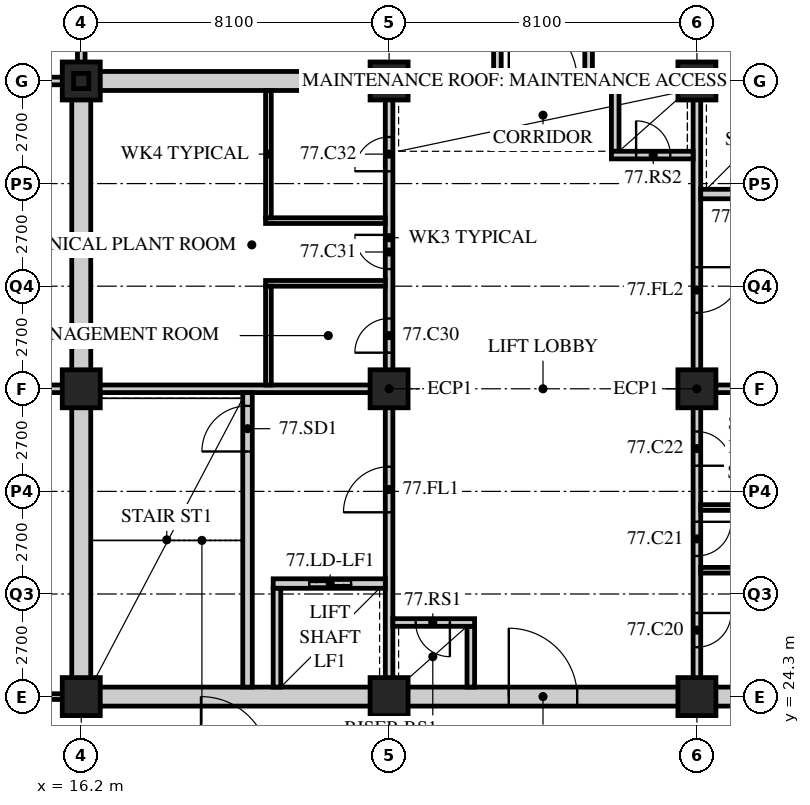
"""IFC4 building model, lengths in metres.
Left out: names, types, materials, properties, quantities, classifications, styles, units other than length and angle.
Written with IfcOpenShell. Run it as: python <this file> out.ifc"""

import sys

from ifc_helpers import new_model, si_unit, direction, frame, frame_2d, origin, origin_2d, place, context, subcontext, project, spatial, rectangle, hollow_rectangle, extrude, element, fill, save


model = new_model("IFC4")
c1 = context("Model", 3, precision=1e-05, world=origin(), true_north=direction((0.0, 1.0)))
c2 = subcontext(c1, "Body", "Model", "MODEL_VIEW")
j1 = project(units=[si_unit("LENGTHUNIT", "METRE"), si_unit("PLANEANGLEUNIT", "RADIAN")], contexts=[c1])
p1 = place(None, origin())
s1 = spatial("IfcSite", under=j1, at=p1, CompositionType="ELEMENT")
p2 = place(p1, origin())
s2 = spatial("IfcBuilding", under=s1, at=p2, CompositionType="ELEMENT")
p3 = place(p2, frame((0.0, 0.0, 303.9)))
s3 = spatial("IfcBuildingStorey", under=s2, at=p3, CompositionType="ELEMENT", Elevation=303.9)
for number, where, z_axis, x_axis in (
    (1, (16.2, 24.3, 0.0), (0.0, 0.0, 1.0), (1.0, 0.0, 0.0)),
    (2, (16.2, 32.4, 0.0), (0.0, 0.0, 1.0), (1.0, 0.0, 0.0)),
    (3, (16.2, 40.5, 0.0), (0.0, 0.0, 1.0), (1.0, 0.0, 0.0)),
    (4, (24.3, 24.3, 0.0), (0.0, 0.0, 1.0), (1.0, 0.0, 0.0)),
    (5, (24.3, 32.4, 0.0), (0.0, 0.0, 1.0), (1.0, 0.0, 0.0)),
    (6, (24.3, 40.5, 0.0), (0.0, 0.0, 1.0), (1.0, 0.0, 0.0)),
    (7, (32.4, 24.3, 0.0), (0.0, 0.0, 1.0), (1.0, 0.0, 0.0)),
    (8, (32.4, 32.4, 0.0), (0.0, 0.0, 1.0), (1.0, 0.0, 0.0)),
    (9, (32.4, 40.5, 0.0), (0.0, 0.0, 1.0), (1.0, 0.0, 0.0)),
):
    element("IfcColumn", number, at=place(p3, frame(where, z_axis=z_axis, x_axis=x_axis)), inside=s3, PredefinedType="COLUMN", context=c2, shape_type="SweptSolid", body=[
        extrude(hollow_rectangle(XDim=1.0, YDim=1.0, WallThickness=0.1, at=origin_2d()), origin(), (0.0, 0.0, 1.0), 6.0),
    ])
for number, where, z_axis, x_axis in (
    (10, (16.2, 40.5, 6.0), (0.0, 0.0, 1.0), (1.0, 0.0, 0.0)),
    (11, (24.3, 40.5, 6.0), (0.0, 0.0, 1.0), (1.0, 0.0, 0.0)),
    (12, (32.4, 40.5, 6.0), (0.0, 0.0, 1.0), (1.0, 0.0, 0.0)),
):
    element("IfcColumn", number, at=place(p3, frame(where, z_axis=z_axis, x_axis=x_axis)), inside=s3, PredefinedType="COLUMN", context=c2, shape_type="SweptSolid", body=[
        extrude(hollow_rectangle(XDim=0.4, YDim=0.4, WallThickness=0.016, at=origin_2d()), origin(), (0.0, 0.0, 1.0), 13.896),
    ])
p4 = place(p3, frame((9.9, 24.3, 0.0), z_axis=(0.0, 0.0, 1.0), x_axis=(1.0, 0.0, 0.0)))
e13 = element("IfcWall", 13, at=p4, inside=s3, PredefinedType="PARTITIONING", context=c2, shape_type="SweptSolid", body=[
    extrude(rectangle(XDim=6.1, YDim=0.15, at=frame_2d((3.05, 0.0))), origin(), (0.0, 0.0, 1.0), 5.038),
])
p5 = place(p3, frame((9.9, 32.4, 0.0), z_axis=(0.0, 0.0, 1.0), x_axis=(1.0, 0.0, 0.0)))
e14 = element("IfcWall", 14, at=p5, inside=s3, PredefinedType="SOLIDWALL", context=c2, shape_type="SweptSolid", body=[
    extrude(rectangle(XDim=6.3, YDim=0.2, at=frame_2d((3.15, 0.0))), origin(), (0.0, 0.0, 1.0), 5.038),
])
p6 = place(p3, frame((16.2, 40.5, 0.0), z_axis=(0.0, 0.0, 1.0), x_axis=(0.0, 1.0, 0.0)))
e15 = element("IfcWall", 15, at=p6, inside=s3, PredefinedType="SOLIDWALL", context=c2, shape_type="SweptSolid", body=[
    extrude(rectangle(XDim=14.4, YDim=0.2, at=frame_2d((7.2, 0.0))), origin(), (0.0, 0.0, 1.0), 5.038),
])
for number, where, z_axis, x_axis in (
    (16, (27.15, 40.5, 0.0), (0.0, 0.0, 1.0), (0.0, 1.0, 0.0)),
    (17, (29.55, 40.5, 0.0), (0.0, 0.0, 1.0), (0.0, 1.0, 0.0)),
):
    element("IfcWall", number, at=place(p3, frame(where, z_axis=z_axis, x_axis=x_axis)), inside=s3, PredefinedType="SOLIDWALL", context=c2, shape_type="SweptSolid", body=[
        extrude(rectangle(XDim=14.4, YDim=0.2, at=frame_2d((7.2, 0.0))), origin(), (0.0, 0.0, 1.0), 5.8),
    ])
p7 = place(p3, frame((9.9, 40.5, 0.0), z_axis=(0.0, 0.0, 1.0), x_axis=(1.0, 0.0, 0.0)))
e18 = element("IfcWall", 18, at=p7, inside=s3, PredefinedType="SOLIDWALL", context=c2, shape_type="SweptSolid", body=[
    extrude(rectangle(XDim=6.3, YDim=0.2, at=frame_2d((3.15, 0.0))), origin(), (0.0, 0.0, 1.0), 5.038),
])
p8 = place(p3, frame((15.95, 24.3, 0.0), z_axis=(0.0, 0.0, 1.0), x_axis=(1.0, 0.0, 0.0)))
e19 = element("IfcWall", 19, at=p8, inside=s3, PredefinedType="SOLIDWALL", context=c2, shape_type="SweptSolid", body=[
    extrude(rectangle(XDim=24.8, YDim=0.5, at=frame_2d((12.4, 0.0))), origin(), (0.0, 0.0, 1.0), 5.038),
])
p9 = place(p8, frame((11.5, 0.0, 0.0)))
e20 = element("IfcOpeningElement", 20, at=p9, cuts=e19, PredefinedType="OPENING", context=c2, shape_type="SweptSolid", body=[
    extrude(rectangle(XDim=1.8, YDim=2.4, at=frame_2d((0.9, 1.2))), frame((0.0, 0.26, 0.0), z_axis=(0.0, -1.0, 0.0), x_axis=(1.0, 0.0, 0.0)), (0.0, 0.0, 1.0), 0.52),
])
p10 = place(p3, frame((15.95, 40.5, 0.0), z_axis=(0.0, 0.0, 1.0), x_axis=(1.0, 0.0, 0.0)))
e21 = element("IfcWall", 21, at=p10, inside=s3, PredefinedType="SOLIDWALL", context=c2, shape_type="SweptSolid", body=[
    extrude(rectangle(XDim=24.8, YDim=0.5, at=frame_2d((12.4, 0.0))), origin(), (0.0, 0.0, 1.0), 5.038),
])
p11 = place(p10, frame((11.5, 0.0, 0.0)))
e22 = element("IfcOpeningElement", 22, at=p11, cuts=e21, PredefinedType="OPENING", context=c2, shape_type="SweptSolid", body=[
    extrude(rectangle(XDim=1.8, YDim=2.4, at=frame_2d((0.9, 1.2))), frame((0.0, 0.26, 0.0), z_axis=(0.0, -1.0, 0.0), x_axis=(1.0, 0.0, 0.0)), (0.0, 0.0, 1.0), 0.52),
])
p12 = place(p3, frame((16.2, 24.55, 0.0), z_axis=(0.0, 0.0, 1.0), x_axis=(0.0, 1.0, 0.0)))
e23 = element("IfcWall", 23, at=p12, inside=s3, PredefinedType="SOLIDWALL", context=c2, shape_type="SweptSolid", body=[
    extrude(rectangle(XDim=15.7, YDim=0.5, at=frame_2d((7.85, 0.0))), origin(), (0.0, 0.0, 1.0), 5.038),
])
p13 = place(p3, frame((16.45, 32.4, 0.0), z_axis=(0.0, 0.0, 1.0), x_axis=(1.0, 0.0, 0.0)))
e24 = element("IfcWall", 24, at=p13, inside=s3, PredefinedType="SOLIDWALL", context=c2, shape_type="SweptSolid", body=[
    extrude(rectangle(XDim=7.95, YDim=0.2, at=frame_2d((3.975, 0.0))), origin(), (0.0, 0.0, 1.0), 5.038),
])
p14 = place(p3, frame((24.3, 24.55, 0.0), z_axis=(0.0, 0.0, 1.0), x_axis=(0.0, 1.0, 0.0)))
e25 = element("IfcWall", 25, at=p14, inside=s3, PredefinedType="SOLIDWALL", context=c2, shape_type="SweptSolid", body=[
    extrude(rectangle(XDim=7.75, YDim=0.2, at=frame_2d((3.875, 0.0))), origin(), (0.0, 0.0, 1.0), 5.038),
])
p15 = place(p14, frame((4.6, 0.0, 0.0)))
e26 = element("IfcOpeningElement", 26, at=p15, cuts=e25, PredefinedType="OPENING", context=c2, shape_type="SweptSolid", body=[
    extrude(rectangle(XDim=1.2, YDim=2.1, at=frame_2d((0.6, 1.05))), frame((0.0, 0.11, 0.0), z_axis=(0.0, -1.0, 0.0), x_axis=(1.0, 0.0, 0.0)), (0.0, 0.0, 1.0), 0.22),
])
p16 = place(p3, frame((20.575, 24.55, 0.0), z_axis=(0.0, 0.0, 1.0), x_axis=(0.0, 1.0, 0.0)))
e27 = element("IfcWall", 27, at=p16, inside=s3, PredefinedType="SOLIDWALL", context=c2, shape_type="SweptSolid", body=[
    extrude(rectangle(XDim=7.75, YDim=0.25, at=frame_2d((3.875, 0.0))), origin(), (0.0, 0.0, 1.0), 5.8),
])
p17 = place(p16, frame((6.2, 0.0, 0.0)))
e28 = element("IfcOpeningElement", 28, at=p17, cuts=e27, PredefinedType="OPENING", context=c2, shape_type="SweptSolid", body=[
    extrude(rectangle(XDim=1.2, YDim=2.1, at=frame_2d((0.6, 1.05))), frame((0.0, 0.135, 0.0), z_axis=(0.0, -1.0, 0.0), x_axis=(1.0, 0.0, 0.0)), (0.0, 0.0, 1.0), 0.27),
])
p18 = place(p3, frame((21.25, 27.275, 0.0), z_axis=(0.0, 0.0, 1.0), x_axis=(1.0, 0.0, 0.0)))
e29 = element("IfcWall", 29, at=p18, inside=s3, PredefinedType="SOLIDWALL", context=c2, shape_type="SweptSolid", body=[
    extrude(rectangle(XDim=2.95, YDim=0.25, at=frame_2d((1.475, 0.0))), origin(), (0.0, 0.0, 1.0), 5.8),
])
p19 = place(p18, frame((0.95, 0.0, 0.0)))
e30 = element("IfcOpeningElement", 30, at=p19, cuts=e29, PredefinedType="OPENING", context=c2, shape_type="SweptSolid", body=[
    extrude(rectangle(XDim=1.1, YDim=2.4, at=frame_2d((0.55, 1.2))), frame((0.0, 0.135, 0.0), z_axis=(0.0, -1.0, 0.0), x_axis=(1.0, 0.0, 0.0)), (0.0, 0.0, 1.0), 0.27),
])
p20 = place(p3, frame((21.35, 24.55, 0.0), z_axis=(0.0, 0.0, 1.0), x_axis=(0.0, 1.0, 0.0)))
e31 = element("IfcWall", 31, at=p20, inside=s3, PredefinedType="SOLIDWALL", context=c2, shape_type="SweptSolid", body=[
    extrude(rectangle(XDim=2.6, YDim=0.2, at=frame_2d((1.3, 0.0))), origin(), (0.0, 0.0, 1.0), 5.8),
])
p21 = place(p3, frame((26.45, 24.55, 0.0), z_axis=(0.0, 0.0, 1.0), x_axis=(0.0, 1.0, 0.0)))
e32 = element("IfcWall", 32, at=p21, inside=s3, PredefinedType="SOLIDWALL", context=c2, shape_type="SweptSolid", body=[
    extrude(rectangle(XDim=1.6, YDim=0.2, at=frame_2d((0.8, 0.0))), origin(), (0.0, 0.0, 1.0), 5.8),
])
p22 = place(p3, frame((24.4, 26.25, 0.0), z_axis=(0.0, 0.0, 1.0), x_axis=(1.0, 0.0, 0.0)))
e33 = element("IfcWall", 33, at=p22, inside=s3, PredefinedType="SOLIDWALL", context=c2, shape_type="SweptSolid", body=[
    extrude(rectangle(XDim=2.15, YDim=0.2, at=frame_2d((1.075, 0.0))), origin(), (0.0, 0.0, 1.0), 5.8),
])
p23 = place(p22, frame((0.6, 0.0, 0.0)))
e34 = element("IfcOpeningElement", 34, at=p23, cuts=e33, PredefinedType="OPENING", context=c2, shape_type="SweptSolid", body=[
    extrude(rectangle(XDim=0.9, YDim=2.1, at=frame_2d((0.45, 1.05))), frame((0.0, 0.11, 0.0), z_axis=(0.0, -1.0, 0.0), x_axis=(1.0, 0.0, 0.0)), (0.0, 0.0, 1.0), 0.22),
])
p24 = place(p3, frame((32.3, 32.4, 0.0), z_axis=(0.0, 0.0, 1.0), x_axis=(1.0, 0.0, 0.0)))
e35 = element("IfcWall", 35, at=p24, inside=s3, PredefinedType="SOLIDWALL", context=c2, shape_type="SweptSolid", body=[
    extrude(rectangle(XDim=7.95, YDim=0.2, at=frame_2d((3.975, 0.0))), origin(), (0.0, 0.0, 1.0), 5.038),
])
p25 = place(p3, frame((32.4, 32.5, 0.0), z_axis=(0.0, 0.0, 1.0), x_axis=(0.0, 1.0, 0.0)))
e36 = element("IfcWall", 36, at=p25, inside=s3, PredefinedType="SOLIDWALL", context=c2, shape_type="SweptSolid", body=[
    extrude(rectangle(XDim=7.75, YDim=0.2, at=frame_2d((3.875, 0.0))), origin(), (0.0, 0.0, 1.0), 5.038),
])
p26 = place(p25, frame((1.9, 0.0, 0.0)))
e37 = element("IfcOpeningElement", 37, at=p26, cuts=e36, PredefinedType="OPENING", context=c2, shape_type="SweptSolid", body=[
    extrude(rectangle(XDim=1.2, YDim=2.1, at=frame_2d((0.6, 1.05))), frame((0.0, 0.11, 0.0), z_axis=(0.0, -1.0, 0.0), x_axis=(1.0, 0.0, 0.0)), (0.0, 0.0, 1.0), 0.22),
])
p27 = place(p3, frame((32.5, 37.525, 0.0), z_axis=(0.0, 0.0, 1.0), x_axis=(1.0, 0.0, 0.0)))
e38 = element("IfcWall", 38, at=p27, inside=s3, PredefinedType="SOLIDWALL", context=c2, shape_type="SweptSolid", body=[
    extrude(rectangle(XDim=2.95, YDim=0.25, at=frame_2d((1.475, 0.0))), origin(), (0.0, 0.0, 1.0), 5.8),
])
p28 = place(p27, frame((0.9, 0.0, 0.0)))
e39 = element("IfcOpeningElement", 39, at=p28, cuts=e38, PredefinedType="OPENING", context=c2, shape_type="SweptSolid", body=[
    extrude(rectangle(XDim=1.1, YDim=2.4, at=frame_2d((0.55, 1.2))), frame((0.0, 0.135, 0.0), z_axis=(0.0, -1.0, 0.0), x_axis=(1.0, 0.0, 0.0)), (0.0, 0.0, 1.0), 0.27),
])
p29 = place(p3, frame((30.25, 38.65, 0.0), z_axis=(0.0, 0.0, 1.0), x_axis=(0.0, 1.0, 0.0)))
e40 = element("IfcWall", 40, at=p29, inside=s3, PredefinedType="SOLIDWALL", context=c2, shape_type="SweptSolid", body=[
    extrude(rectangle(XDim=1.6, YDim=0.2, at=frame_2d((0.8, 0.0))), origin(), (0.0, 0.0, 1.0), 5.8),
])
p30 = place(p3, frame((30.15, 38.55, 0.0), z_axis=(0.0, 0.0, 1.0), x_axis=(1.0, 0.0, 0.0)))
e41 = element("IfcWall", 41, at=p30, inside=s3, PredefinedType="SOLIDWALL", context=c2, shape_type="SweptSolid", body=[
    extrude(rectangle(XDim=2.15, YDim=0.2, at=frame_2d((1.075, 0.0))), origin(), (0.0, 0.0, 1.0), 5.8),
])
p31 = place(p30, frame((0.65, 0.0, 0.0)))
e42 = element("IfcOpeningElement", 42, at=p31, cuts=e41, PredefinedType="OPENING", context=c2, shape_type="SweptSolid", body=[
    extrude(rectangle(XDim=0.9, YDim=2.1, at=frame_2d((0.45, 1.05))), frame((0.0, 0.11, 0.0), z_axis=(0.0, -1.0, 0.0), x_axis=(1.0, 0.0, 0.0)), (0.0, 0.0, 1.0), 0.22),
])
p32 = place(p3, frame((24.3, 32.5, 0.0), z_axis=(0.0, 0.0, 1.0), x_axis=(0.0, 1.0, 0.0)))
e43 = element("IfcWall", 43, at=p32, inside=s3, PredefinedType="PARTITIONING", context=c2, shape_type="SweptSolid", body=[
    extrude(rectangle(XDim=7.75, YDim=0.2, at=frame_2d((3.875, 0.0))), origin(), (0.0, 0.0, 1.0), 5.038),
])
p33 = place(p32, frame((0.85, 0.0, 0.0)))
e44 = element("IfcOpeningElement", 44, at=p33, cuts=e43, PredefinedType="OPENING", context=c2, shape_type="SweptSolid", body=[
    extrude(rectangle(XDim=0.9, YDim=2.1, at=frame_2d((0.45, 1.05))), frame((0.0, 0.11, 0.0), z_axis=(0.0, -1.0, 0.0), x_axis=(1.0, 0.0, 0.0)), (0.0, 0.0, 1.0), 0.22),
])
p34 = place(p32, frame((3.05, 0.0, 0.0)))
e45 = element("IfcOpeningElement", 45, at=p34, cuts=e43, PredefinedType="OPENING", context=c2, shape_type="SweptSolid", body=[
    extrude(rectangle(XDim=0.9, YDim=2.1, at=frame_2d((0.45, 1.05))), frame((0.0, 0.11, 0.0), z_axis=(0.0, -1.0, 0.0), x_axis=(1.0, 0.0, 0.0)), (0.0, 0.0, 1.0), 0.22),
])
p35 = place(p32, frame((5.625, 0.0, 0.0)))
e46 = element("IfcOpeningElement", 46, at=p35, cuts=e43, PredefinedType="OPENING", context=c2, shape_type="SweptSolid", body=[
    extrude(rectangle(XDim=0.9, YDim=2.1, at=frame_2d((0.45, 1.05))), frame((0.0, 0.11, 0.0), z_axis=(0.0, -1.0, 0.0), x_axis=(1.0, 0.0, 0.0)), (0.0, 0.0, 1.0), 0.22),
])
for number, where, z_axis, x_axis in (
    (47, (21.05, 35.175, 0.0), (0.0, 0.0, 1.0), (1.0, 0.0, 0.0)),
    (48, (21.05, 36.825, 0.0), (0.0, 0.0, 1.0), (1.0, 0.0, 0.0)),
):
    element("IfcWall", number, at=place(p3, frame(where, z_axis=z_axis, x_axis=x_axis)), inside=s3, PredefinedType="PARTITIONING", context=c2, shape_type="SweptSolid", body=[
        extrude(rectangle(XDim=3.15, YDim=0.15, at=frame_2d((1.575, 0.0))), origin(), (0.0, 0.0, 1.0), 5.8),
    ])
p36 = place(p3, frame((21.125, 32.5, 0.0), z_axis=(0.0, 0.0, 1.0), x_axis=(0.0, 1.0, 0.0)))
e49 = element("IfcWall", 49, at=p36, inside=s3, PredefinedType="PARTITIONING", context=c2, shape_type="SweptSolid", body=[
    extrude(rectangle(XDim=2.6, YDim=0.15, at=frame_2d((1.3, 0.0))), origin(), (0.0, 0.0, 1.0), 5.8),
])
p37 = place(p3, frame((21.125, 36.9, 0.0), z_axis=(0.0, 0.0, 1.0), x_axis=(0.0, 1.0, 0.0)))
e50 = element("IfcWall", 50, at=p37, inside=s3, PredefinedType="PARTITIONING", context=c2, shape_type="SweptSolid", body=[
    extrude(rectangle(XDim=3.35, YDim=0.15, at=frame_2d((1.675, 0.0))), origin(), (0.0, 0.0, 1.0), 5.8),
])
p38 = place(p3, frame((32.4, 24.55, 0.0), z_axis=(0.0, 0.0, 1.0), x_axis=(0.0, 1.0, 0.0)))
e51 = element("IfcWall", 51, at=p38, inside=s3, PredefinedType="PARTITIONING", context=c2, shape_type="SweptSolid", body=[
    extrude(rectangle(XDim=7.75, YDim=0.2, at=frame_2d((3.875, 0.0))), origin(), (0.0, 0.0, 1.0), 5.038),
])
p39 = place(p38, frame((1.05, 0.0, 0.0)))
e52 = element("IfcOpeningElement", 52, at=p39, cuts=e51, PredefinedType="OPENING", context=c2, shape_type="SweptSolid", body=[
    extrude(rectangle(XDim=0.9, YDim=2.1, at=frame_2d((0.45, 1.05))), frame((0.0, 0.11, 0.0), z_axis=(0.0, -1.0, 0.0), x_axis=(1.0, 0.0, 0.0)), (0.0, 0.0, 1.0), 0.22),
])
p40 = place(p38, frame((3.45, 0.0, 0.0)))
e53 = element("IfcOpeningElement", 53, at=p40, cuts=e51, PredefinedType="OPENING", context=c2, shape_type="SweptSolid", body=[
    extrude(rectangle(XDim=0.9, YDim=2.1, at=frame_2d((0.45, 1.05))), frame((0.0, 0.11, 0.0), z_axis=(0.0, -1.0, 0.0), x_axis=(1.0, 0.0, 0.0)), (0.0, 0.0, 1.0), 0.22),
])
p41 = place(p38, frame((5.825, 0.0, 0.0)))
e54 = element("IfcOpeningElement", 54, at=p41, cuts=e51, PredefinedType="OPENING", context=c2, shape_type="SweptSolid", body=[
    extrude(rectangle(XDim=0.9, YDim=2.1, at=frame_2d((0.45, 1.05))), frame((0.0, 0.11, 0.0), z_axis=(0.0, -1.0, 0.0), x_axis=(1.0, 0.0, 0.0)), (0.0, 0.0, 1.0), 0.22),
])
for number, where, z_axis, x_axis in (
    (55, (32.5, 27.625, 0.0), (0.0, 0.0, 1.0), (1.0, 0.0, 0.0)),
    (56, (32.5, 29.275, 0.0), (0.0, 0.0, 1.0), (1.0, 0.0, 0.0)),
):
    element("IfcWall", number, at=place(p3, frame(where, z_axis=z_axis, x_axis=x_axis)), inside=s3, PredefinedType="PARTITIONING", context=c2, shape_type="SweptSolid", body=[
        extrude(rectangle(XDim=3.15, YDim=0.15, at=frame_2d((1.575, 0.0))), origin(), (0.0, 0.0, 1.0), 5.8),
    ])
p42 = place(p33, origin())
e57 = element("IfcDoor", 57, at=p42, inside=s3, OperationType="SINGLE_SWING_LEFT", PredefinedType="DOOR", context=c2, shape_type="SweptSolid", body=[
    extrude(rectangle(XDim=0.9, YDim=2.1, at=frame_2d((0.45, 1.05))), frame((0.0, 0.025, 0.0), z_axis=(0.0, -1.0, 0.0), x_axis=(1.0, 0.0, 0.0)), (0.0, 0.0, 1.0), 0.05),
])
fill(e44, e57)
p43 = place(p34, origin())
e58 = element("IfcDoor", 58, at=p43, inside=s3, OperationType="SINGLE_SWING_RIGHT", PredefinedType="DOOR", context=c2, shape_type="SweptSolid", body=[
    extrude(rectangle(XDim=0.9, YDim=2.1, at=frame_2d((0.45, 1.05))), frame((0.0, 0.025, 0.0), z_axis=(0.0, -1.0, 0.0), x_axis=(1.0, 0.0, 0.0)), (0.0, 0.0, 1.0), 0.05),
])
fill(e45, e58)
p44 = place(p35, origin())
e59 = element("IfcDoor", 59, at=p44, inside=s3, OperationType="SINGLE_SWING_LEFT", PredefinedType="DOOR", context=c2, shape_type="SweptSolid", body=[
    extrude(rectangle(XDim=0.9, YDim=2.1, at=frame_2d((0.45, 1.05))), frame((0.0, 0.025, 0.0), z_axis=(0.0, -1.0, 0.0), x_axis=(1.0, 0.0, 0.0)), (0.0, 0.0, 1.0), 0.05),
])
fill(e46, e59)
p45 = place(p39, origin())
e60 = element("IfcDoor", 60, at=p45, inside=s3, OperationType="SINGLE_SWING_LEFT", PredefinedType="DOOR", context=c2, shape_type="SweptSolid", body=[
    extrude(rectangle(XDim=0.9, YDim=2.1, at=frame_2d((0.45, 1.05))), frame((0.0, 0.025, 0.0), z_axis=(0.0, -1.0, 0.0), x_axis=(1.0, 0.0, 0.0)), (0.0, 0.0, 1.0), 0.05),
])
fill(e52, e60)
p46 = place(p40, origin())
e61 = element("IfcDoor", 61, at=p46, inside=s3, OperationType="SINGLE_SWING_LEFT", PredefinedType="DOOR", context=c2, shape_type="SweptSolid", body=[
    extrude(rectangle(XDim=0.9, YDim=2.1, at=frame_2d((0.45, 1.05))), frame((0.0, 0.025, 0.0), z_axis=(0.0, -1.0, 0.0), x_axis=(1.0, 0.0, 0.0)), (0.0, 0.0, 1.0), 0.05),
])
fill(e53, e61)
p47 = place(p41, origin())
e62 = element("IfcDoor", 62, at=p47, inside=s3, OperationType="SINGLE_SWING_RIGHT", PredefinedType="DOOR", context=c2, shape_type="SweptSolid", body=[
    extrude(rectangle(XDim=0.9, YDim=2.1, at=frame_2d((0.45, 1.05))), frame((0.0, 0.025, 0.0), z_axis=(0.0, -1.0, 0.0), x_axis=(1.0, 0.0, 0.0)), (0.0, 0.0, 1.0), 0.05),
])
fill(e54, e62)
p48 = place(p17, origin())
e63 = element("IfcDoor", 63, at=p48, inside=s3, OperationType="SINGLE_SWING_LEFT", PredefinedType="DOOR", context=c2, shape_type="SweptSolid", body=[
    extrude(rectangle(XDim=1.2, YDim=2.1, at=frame_2d((0.6, 1.05))), frame((0.0, 0.025, 0.0), z_axis=(0.0, -1.0, 0.0), x_axis=(1.0, 0.0, 0.0)), (0.0, 0.0, 1.0), 0.05),
])
fill(e28, e63)
p49 = place(p15, origin())
e64 = element("IfcDoor", 64, at=p49, inside=s3, OperationType="SINGLE_SWING_LEFT", PredefinedType="DOOR", context=c2, shape_type="SweptSolid", body=[
    extrude(rectangle(XDim=1.2, YDim=2.1, at=frame_2d((0.6, 1.05))), frame((0.0, 0.025, 0.0), z_axis=(0.0, -1.0, 0.0), x_axis=(1.0, 0.0, 0.0)), (0.0, 0.0, 1.0), 0.05),
])
fill(e26, e64)
p50 = place(p23, origin())
e65 = element("IfcDoor", 65, at=p50, inside=s3, OperationType="SINGLE_SWING_LEFT", PredefinedType="DOOR", context=c2, shape_type="SweptSolid", body=[
    extrude(rectangle(XDim=0.9, YDim=2.1, at=frame_2d((0.45, 1.05))), frame((0.0, 0.025, 0.0), z_axis=(0.0, -1.0, 0.0), x_axis=(1.0, 0.0, 0.0)), (0.0, 0.0, 1.0), 0.05),
])
fill(e34, e65)
p51 = place(p26, origin())
e66 = element("IfcDoor", 66, at=p51, inside=s3, OperationType="SINGLE_SWING_LEFT", PredefinedType="DOOR", context=c2, shape_type="SweptSolid", body=[
    extrude(rectangle(XDim=1.2, YDim=2.1, at=frame_2d((0.6, 1.05))), frame((0.0, 0.025, 0.0), z_axis=(0.0, -1.0, 0.0), x_axis=(1.0, 0.0, 0.0)), (0.0, 0.0, 1.0), 0.05),
])
fill(e37, e66)
p52 = place(p31, origin())
e67 = element("IfcDoor", 67, at=p52, inside=s3, OperationType="SINGLE_SWING_LEFT", PredefinedType="DOOR", context=c2, shape_type="SweptSolid", body=[
    extrude(rectangle(XDim=0.9, YDim=2.1, at=frame_2d((0.45, 1.05))), frame((0.0, 0.025, 0.0), z_axis=(0.0, -1.0, 0.0), x_axis=(1.0, 0.0, 0.0)), (0.0, 0.0, 1.0), 0.05),
])
fill(e42, e67)
p53 = place(p19, origin())
e68 = element("IfcDoor", 68, at=p53, inside=s3, OperationType="DOUBLE_DOOR_SLIDING", PredefinedType="DOOR", context=c2, shape_type="SweptSolid", body=[
    extrude(rectangle(XDim=1.1, YDim=2.4, at=frame_2d((0.55, 1.2))), frame((0.0, 0.025, 0.0), z_axis=(0.0, -1.0, 0.0), x_axis=(1.0, 0.0, 0.0)), (0.0, 0.0, 1.0), 0.05),
])
fill(e30, e68)
p54 = place(p9, origin())
e69 = element("IfcDoor", 69, at=p54, inside=s3, OperationType="DOUBLE_DOOR_SINGLE_SWING", PredefinedType="DOOR", context=c2, shape_type="SweptSolid", body=[
    extrude(rectangle(XDim=1.8, YDim=2.4, at=frame_2d((0.9, 1.2))), frame((0.0, 0.025, 0.0), z_axis=(0.0, -1.0, 0.0), x_axis=(1.0, 0.0, 0.0)), (0.0, 0.0, 1.0), 0.05),
])
fill(e20, e69)
p55 = place(p11, origin())
e70 = element("IfcDoor", 70, at=p55, inside=s3, OperationType="DOUBLE_DOOR_SINGLE_SWING", PredefinedType="DOOR", context=c2, shape_type="SweptSolid", body=[
    extrude(rectangle(XDim=1.8, YDim=2.4, at=frame_2d((0.9, 1.2))), frame((0.0, 0.025, 0.0), z_axis=(0.0, -1.0, 0.0), x_axis=(1.0, 0.0, 0.0)), (0.0, 0.0, 1.0), 0.05),
])
fill(e22, e70)
save(model, sys.argv[1])
